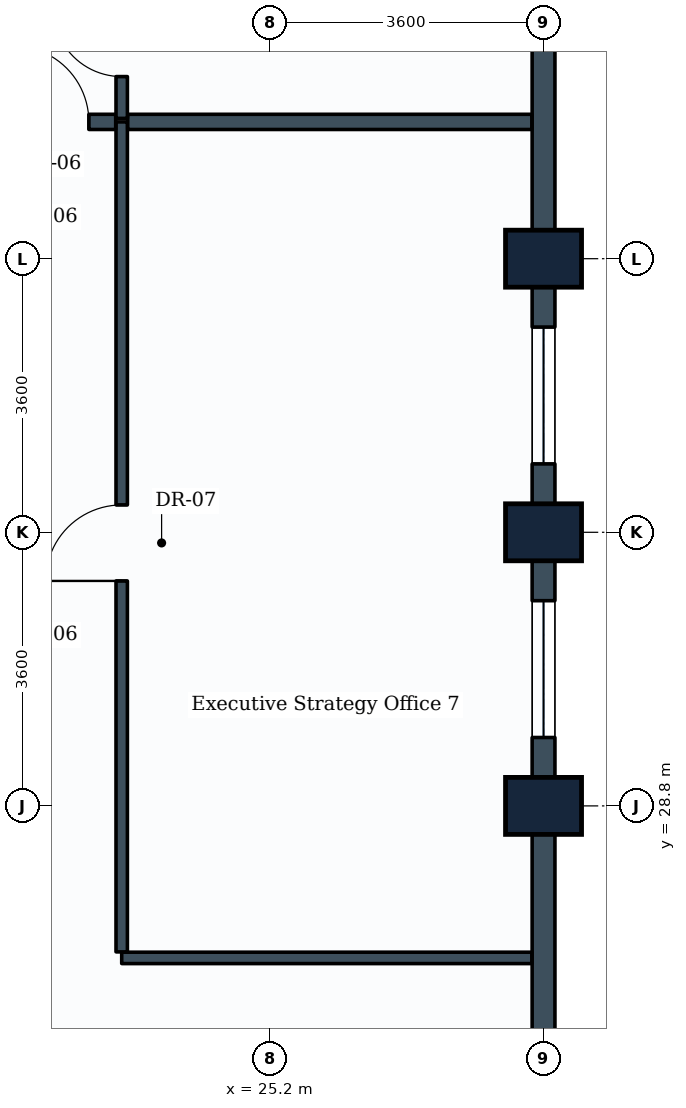
"""IFC4 building model, lengths in metres.
Left out: names, types, materials, properties, quantities, classifications, styles, units other than length and angle.
Written with IfcOpenShell. Run it as: python <this file> out.ifc"""

import sys

from ifc_helpers import new_model, si_unit, direction, frame, frame_2d, origin, origin_2d, place, context, subcontext, project, spatial, rectangle, extrude, element, fill, save


model = new_model("IFC4")
c1 = context("Model", 3, precision=1e-05, world=origin(), true_north=direction((0.0, 1.0)))
c2 = subcontext(c1, "Body", "Model", "MODEL_VIEW")
j1 = project(units=[si_unit("LENGTHUNIT", "METRE"), si_unit("PLANEANGLEUNIT", "RADIAN")], contexts=[c1])
p1 = place(None, origin())
s1 = spatial("IfcSite", under=j1, at=p1, CompositionType="ELEMENT")
p2 = place(p1, origin())
s2 = spatial("IfcBuilding", under=s1, at=p2, CompositionType="ELEMENT")
p3 = place(p2, frame((0.0, 0.0, 165.6)))
s3 = spatial("IfcBuildingStorey", under=s2, at=p3, CompositionType="ELEMENT", Elevation=165.6)
for number, where, z_axis, x_axis in (
    (1, (28.8, 28.8, 0.0), (0.0, 0.0, 1.0), (0.0, 1.0, 0.0)),
    (2, (28.8, 32.4, 0.0), (0.0, 0.0, 1.0), (0.0, 1.0, 0.0)),
    (3, (28.8, 36.0, 0.0), (0.0, 0.0, 1.0), (0.0, 1.0, 0.0)),
):
    element("IfcColumn", number, at=place(p3, frame(where, z_axis=z_axis, x_axis=x_axis)), inside=s3, PredefinedType="COLUMN", context=c2, shape_type="SweptSolid", body=[
        extrude(rectangle(XDim=0.75, YDim=1.0, at=origin_2d()), origin(), (0.0, 0.0, 1.0), 3.8),
    ])
p4 = place(p3, frame((28.8, 28.8, 0.0), z_axis=(0.0, 0.0, 1.0), x_axis=(0.0, -1.0, 0.0)))
e4 = element("IfcWall", 4, at=p4, inside=s3, PredefinedType="STANDARD", context=c2, shape_type="SweptSolid", body=[
    extrude(rectangle(XDim=3.6, YDim=0.3, at=frame_2d((1.8, 0.0))), origin(), (0.0, 0.0, 1.0), 3.1),
])
p5 = place(p3, frame((28.8, 32.4, 0.0), z_axis=(0.0, 0.0, 1.0), x_axis=(0.0, -1.0, 0.0)))
e5 = element("IfcWall", 5, at=p5, inside=s3, PredefinedType="STANDARD", context=c2, shape_type="SweptSolid", body=[
    extrude(rectangle(XDim=3.6, YDim=0.3, at=frame_2d((1.8, 0.0))), origin(), (0.0, 0.0, 1.0), 2.93),
])
p6 = place(p5, frame((0.9, 0.0, 0.85)))
e6 = element("IfcOpeningElement", 6, at=p6, cuts=e5, PredefinedType="OPENING", context=c2, shape_type="SweptSolid", body=[
    extrude(rectangle(XDim=1.8, YDim=1.35, at=frame_2d((0.9, 0.675))), frame((0.0, 0.16, 0.0), z_axis=(0.0, -1.0, 0.0), x_axis=(1.0, 0.0, 0.0)), (0.0, 0.0, 1.0), 0.32),
])
p7 = place(p3, frame((28.8, 36.0, 0.0), z_axis=(0.0, 0.0, 1.0), x_axis=(0.0, -1.0, 0.0)))
e7 = element("IfcWall", 7, at=p7, inside=s3, PredefinedType="STANDARD", context=c2, shape_type="SweptSolid", body=[
    extrude(rectangle(XDim=3.6, YDim=0.3, at=frame_2d((1.8, 0.0))), origin(), (0.0, 0.0, 1.0), 2.93),
])
p8 = place(p7, frame((0.9, 0.0, 0.85)))
e8 = element("IfcOpeningElement", 8, at=p8, cuts=e7, PredefinedType="OPENING", context=c2, shape_type="SweptSolid", body=[
    extrude(rectangle(XDim=1.8, YDim=1.35, at=frame_2d((0.9, 0.675))), frame((0.0, 0.16, 0.0), z_axis=(0.0, -1.0, 0.0), x_axis=(1.0, 0.0, 0.0)), (0.0, 0.0, 1.0), 0.32),
])
p9 = place(p3, frame((28.8, 39.6, 0.0), z_axis=(0.0, 0.0, 1.0), x_axis=(0.0, -1.0, 0.0)))
e9 = element("IfcWall", 9, at=p9, inside=s3, PredefinedType="STANDARD", context=c2, shape_type="SweptSolid", body=[
    extrude(rectangle(XDim=3.6, YDim=0.3, at=frame_2d((1.8, 0.0))), origin(), (0.0, 0.0, 1.0), 2.93),
])
p10 = place(p3, frame((23.25, 26.8, 0.0), z_axis=(0.0, 0.0, 1.0), x_axis=(1.0, 0.0, 0.0)))
e10 = element("IfcWall", 10, at=p10, inside=s3, PredefinedType="PARTITIONING", context=c2, shape_type="SweptSolid", body=[
    extrude(rectangle(XDim=5.396, YDim=0.15, at=frame_2d((2.698, 0.0))), origin(), (0.0, 0.0, 1.0), 3.465),
])
p11 = place(p3, frame((23.25, 26.879, 0.0), z_axis=(0.0, 0.0, 1.0), x_axis=(0.0, 1.0, 0.0)))
e11 = element("IfcWall", 11, at=p11, inside=s3, PredefinedType="PARTITIONING", context=c2, shape_type="SweptSolid", body=[
    extrude(rectangle(XDim=10.921, YDim=0.15, at=frame_2d((5.46, 0.0))), origin(), (0.0, 0.0, 1.0), 3.1),
])
p12 = place(p11, frame((4.881, 0.0, 0.0)))
e12 = element("IfcOpeningElement", 12, at=p12, cuts=e11, PredefinedType="OPENING", context=c2, shape_type="SweptSolid", body=[
    extrude(rectangle(XDim=1.0, YDim=2.1, at=frame_2d((0.5, 1.05))), frame((0.0, 0.085, 0.0), z_axis=(0.0, -1.0, 0.0), x_axis=(1.0, 0.0, 0.0)), (0.0, 0.0, 1.0), 0.17),
])
p13 = place(p3, frame((23.329, 37.8, 0.0), z_axis=(0.0, 0.0, 1.0), x_axis=(1.0, 0.0, 0.0)))
e13 = element("IfcWall", 13, at=p13, inside=s3, PredefinedType="PARTITIONING", context=c2, shape_type="SweptSolid", body=[
    extrude(rectangle(XDim=5.317, YDim=0.2, at=frame_2d((2.658, 0.0))), origin(), (0.0, 0.0, 1.0), 2.93),
])
p14 = place(p3, frame((21.504, 37.8, 0.0), z_axis=(0.0, 0.0, 1.0), x_axis=(1.0, 0.0, 0.0)))
e14 = element("IfcWall", 14, at=p14, inside=s3, PredefinedType="PARTITIONING", context=c2, shape_type="SweptSolid", body=[
    extrude(rectangle(XDim=1.667, YDim=0.2, at=frame_2d((0.833, 0.0))), origin(), (0.0, 0.0, 1.0), 3.465),
])
p15 = place(p14, frame((0.314, 0.0, 0.0)))
e15 = element("IfcOpeningElement", 15, at=p15, cuts=e14, PredefinedType="OPENING", context=c2, shape_type="SweptSolid", body=[
    extrude(rectangle(XDim=1.0, YDim=2.1, at=frame_2d((0.5, 1.05))), frame((0.0, 0.11, 0.0), z_axis=(0.0, -1.0, 0.0), x_axis=(1.0, 0.0, 0.0)), (0.0, 0.0, 1.0), 0.22),
])
p16 = place(p3, frame((23.25, 37.846, 0.0), z_axis=(0.0, 0.0, 1.0), x_axis=(0.0, 1.0, 0.0)))
e16 = element("IfcWall", 16, at=p16, inside=s3, PredefinedType="PARTITIONING", context=c2, shape_type="SweptSolid", body=[
    extrude(rectangle(XDim=5.2, YDim=0.15, at=frame_2d((2.6, 0.0))), origin(), (0.0, 0.0, 1.0), 2.93),
])
p17 = place(p16, frame((0.55, 0.0, 0.0)))
e17 = element("IfcOpeningElement", 17, at=p17, cuts=e16, PredefinedType="OPENING", context=c2, shape_type="SweptSolid", body=[
    extrude(rectangle(XDim=0.9, YDim=2.1, at=frame_2d((0.45, 1.05))), frame((0.0, 0.085, 0.0), z_axis=(0.0, -1.0, 0.0), x_axis=(1.0, 0.0, 0.0)), (0.0, 0.0, 1.0), 0.17),
])
p18 = place(p6, origin())
e18 = element("IfcWindow", 18, at=p18, inside=s3, PartitioningType="SINGLE_PANEL", PredefinedType="WINDOW", context=c2, shape_type="SweptSolid", body=[
    extrude(rectangle(XDim=1.8, YDim=1.35, at=frame_2d((0.9, 0.675))), frame((0.0, 0.03, 0.0), z_axis=(0.0, -1.0, 0.0), x_axis=(1.0, 0.0, 0.0)), (0.0, 0.0, 1.0), 0.06),
])
fill(e6, e18)
p19 = place(p8, origin())
e19 = element("IfcWindow", 19, at=p19, inside=s3, PartitioningType="SINGLE_PANEL", PredefinedType="WINDOW", context=c2, shape_type="SweptSolid", body=[
    extrude(rectangle(XDim=1.8, YDim=1.35, at=frame_2d((0.9, 0.675))), frame((0.0, 0.03, 0.0), z_axis=(0.0, -1.0, 0.0), x_axis=(1.0, 0.0, 0.0)), (0.0, 0.0, 1.0), 0.06),
])
fill(e8, e19)
p20 = place(p12, origin())
e20 = element("IfcDoor", 20, at=p20, inside=s3, OperationType="SINGLE_SWING_LEFT", PredefinedType="DOOR", context=c2, shape_type="SweptSolid", body=[
    extrude(rectangle(XDim=1.0, YDim=2.1, at=frame_2d((0.5, 1.05))), frame((0.0, 0.025, 0.0), z_axis=(0.0, -1.0, 0.0), x_axis=(1.0, 0.0, 0.0)), (0.0, 0.0, 1.0), 0.05),
])
fill(e12, e20)
p21 = place(p15, origin())
e21 = element("IfcDoor", 21, at=p21, inside=s3, OperationType="SINGLE_SWING_LEFT", PredefinedType="DOOR", context=c2, shape_type="SweptSolid", body=[
    extrude(rectangle(XDim=1.0, YDim=2.1, at=frame_2d((0.5, 1.05))), frame((0.0, 0.025, 0.0), z_axis=(0.0, -1.0, 0.0), x_axis=(1.0, 0.0, 0.0)), (0.0, 0.0, 1.0), 0.05),
])
fill(e15, e21)
p22 = place(p17, origin())
e22 = element("IfcDoor", 22, at=p22, inside=s3, OperationType="SINGLE_SWING_RIGHT", PredefinedType="DOOR", context=c2, shape_type="SweptSolid", body=[
    extrude(rectangle(XDim=0.9, YDim=2.1, at=frame_2d((0.45, 1.05))), frame((0.0, 0.025, 0.0), z_axis=(0.0, -1.0, 0.0), x_axis=(1.0, 0.0, 0.0)), (0.0, 0.0, 1.0), 0.05),
])
fill(e17, e22)
save(model, sys.argv[1])
